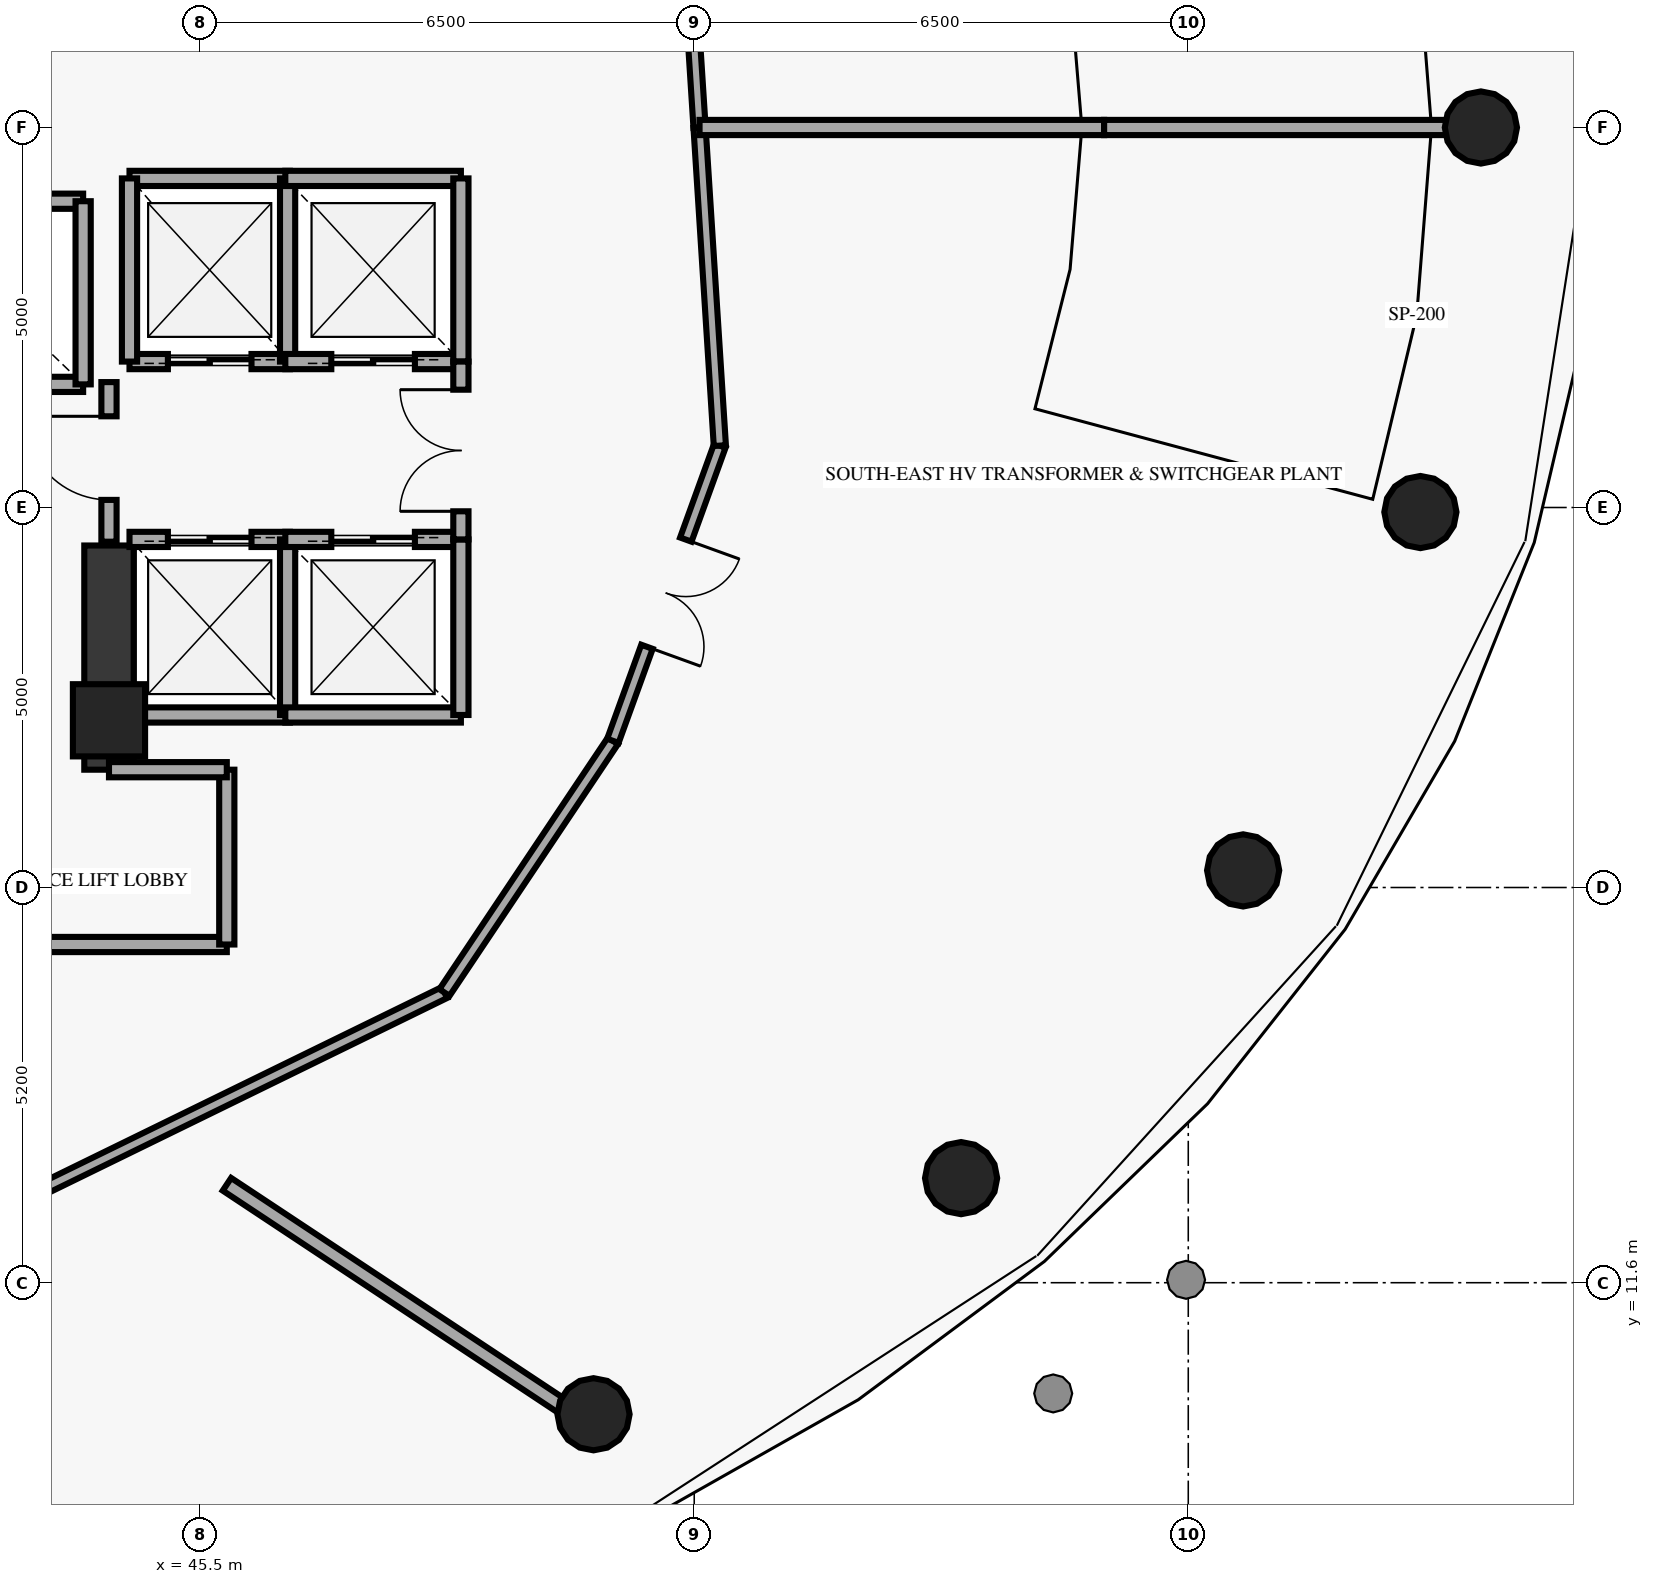
"""IFC4 building model, lengths in metres.
Left out: names, types, materials, properties, quantities, classifications, styles, units other than length and angle.
Written with IfcOpenShell. Run it as: python <this file> out.ifc"""

import sys

from ifc_helpers import new_model, si_unit, direction, frame, frame_2d, origin, origin_2d, place, context, subcontext, project, spatial, rectangle, circle, extrude, element, fill, save


model = new_model("IFC4")
c1 = context("Model", 3, precision=1e-05, world=origin(), true_north=direction((0.0, 1.0)))
c2 = subcontext(c1, "Body", "Model", "MODEL_VIEW")
j1 = project(units=[si_unit("LENGTHUNIT", "METRE"), si_unit("PLANEANGLEUNIT", "RADIAN")], contexts=[c1])
p1 = place(None, origin())
s1 = spatial("IfcSite", under=j1, at=p1, CompositionType="ELEMENT")
p2 = place(p1, origin())
s2 = spatial("IfcBuilding", under=s1, at=p2, CompositionType="ELEMENT")
p3 = place(p2, frame((0.0, 0.0, 195.95)))
s3 = spatial("IfcBuildingStorey", under=s2, at=p3, CompositionType="ELEMENT", Elevation=195.95)
p4 = place(p3, frame((44.3, 19.0, 0.0), z_axis=(0.0, 0.0, 1.0), x_axis=(1.0, 0.0, 0.0)))
e1 = element("IfcColumn", 1, at=p4, inside=s3, PredefinedType="PILASTER", context=c2, shape_type="SweptSolid", body=[
    extrude(rectangle(XDim=0.95, YDim=0.95, at=origin_2d()), origin(), (0.0, 0.0, 1.0), 6.88),
])
for number, where, z_axis, x_axis in (
    (2, (62.35, 26.8, 0.0), (0.0, 0.0, 1.0), (1.0, 0.0, 0.0)),
    (3, (50.675, 9.869, 0.0), (0.0, 0.0, 1.0), (1.0, 0.0, 0.0)),
    (4, (55.511, 12.976, 0.0), (0.0, 0.0, 1.0), (1.0, 0.0, 0.0)),
    (5, (59.222, 17.025, 0.0), (0.0, 0.0, 1.0), (1.0, 0.0, 0.0)),
    (6, (61.554, 21.74, 0.0), (0.0, 0.0, 1.0), (1.0, 0.0, 0.0)),
):
    element("IfcColumn", number, at=place(p3, frame(where, z_axis=z_axis, x_axis=x_axis)), inside=s3, PredefinedType="COLUMN", context=c2, shape_type="SweptSolid", body=[
        extrude(circle(Radius=0.475, at=origin_2d()), origin(), (0.0, 0.0, 1.0), 6.88),
    ])
p5 = place(p3, frame((44.3, 18.35, 0.0), z_axis=(0.0, 0.0, 1.0), x_axis=(0.0, 1.0, 0.0)))
e7 = element("IfcWall", 7, at=p5, inside=s3, PredefinedType="SHEAR", context=c2, shape_type="SweptSolid", body=[
    extrude(rectangle(XDim=2.95, YDim=0.65, at=frame_2d((1.475, 0.0))), origin(), (0.0, 0.0, 1.0), 6.88),
])
p6 = place(p3, frame((44.57, 23.72, 0.0), z_axis=(0.0, 0.0, 1.0), x_axis=(1.0, 0.0, 0.0)))
e8 = element("IfcWall", 8, at=p6, inside=s3, PredefinedType="SOLIDWALL", context=c2, shape_type="SweptSolid", body=[
    extrude(rectangle(XDim=2.11, YDim=0.2, at=frame_2d((1.055, 0.0))), origin(), (0.0, 0.0, 1.0), 6.88),
])
p7 = place(p6, frame((0.505, 0.0, 0.0)))
e9 = element("IfcOpeningElement", 9, at=p7, cuts=e8, PredefinedType="OPENING", context=c2, shape_type="SweptSolid", body=[
    extrude(rectangle(XDim=1.1, YDim=2.15, at=frame_2d((0.55, 1.075))), frame((0.0, 0.11, 0.0), z_axis=(0.0, -1.0, 0.0), x_axis=(1.0, 0.0, 0.0)), (0.0, 0.0, 1.0), 0.22),
])
p8 = place(p3, frame((44.57, 26.13, 0.0), z_axis=(0.0, 0.0, 1.0), x_axis=(1.0, 0.0, 0.0)))
e10 = element("IfcWall", 10, at=p8, inside=s3, PredefinedType="SOLIDWALL", context=c2, shape_type="SweptSolid", body=[
    extrude(rectangle(XDim=2.11, YDim=0.2, at=frame_2d((1.055, 0.0))), origin(), (0.0, 0.0, 1.0), 6.88),
])
for number, where, z_axis, x_axis in (
    (11, (44.57, 23.72, 0.0), (0.0, 0.0, 1.0), (0.0, 1.0, 0.0)),
    (12, (46.65, 23.72, 0.0), (0.0, 0.0, 1.0), (0.0, 1.0, 0.0)),
):
    element("IfcWall", number, at=place(p3, frame(where, z_axis=z_axis, x_axis=x_axis)), inside=s3, PredefinedType="SOLIDWALL", context=c2, shape_type="SweptSolid", body=[
        extrude(rectangle(XDim=2.41, YDim=0.2, at=frame_2d((1.205, 0.0))), origin(), (0.0, 0.0, 1.0), 6.88),
    ])
p9 = place(p3, frame((46.62, 23.72, 0.0), z_axis=(0.0, 0.0, 1.0), x_axis=(1.0, 0.0, 0.0)))
e13 = element("IfcWall", 13, at=p9, inside=s3, PredefinedType="SOLIDWALL", context=c2, shape_type="SweptSolid", body=[
    extrude(rectangle(XDim=2.31, YDim=0.2, at=frame_2d((1.155, 0.0))), origin(), (0.0, 0.0, 1.0), 6.88),
])
p10 = place(p9, frame((0.605, 0.0, 0.0)))
e14 = element("IfcOpeningElement", 14, at=p10, cuts=e13, PredefinedType="OPENING", context=c2, shape_type="SweptSolid", body=[
    extrude(rectangle(XDim=1.1, YDim=2.15, at=frame_2d((0.55, 1.075))), frame((0.0, 0.11, 0.0), z_axis=(0.0, -1.0, 0.0), x_axis=(1.0, 0.0, 0.0)), (0.0, 0.0, 1.0), 0.22),
])
p11 = place(p3, frame((46.62, 26.13, 0.0), z_axis=(0.0, 0.0, 1.0), x_axis=(1.0, 0.0, 0.0)))
e15 = element("IfcWall", 15, at=p11, inside=s3, PredefinedType="SOLIDWALL", context=c2, shape_type="SweptSolid", body=[
    extrude(rectangle(XDim=2.31, YDim=0.2, at=frame_2d((1.155, 0.0))), origin(), (0.0, 0.0, 1.0), 6.88),
])
p12 = place(p3, frame((48.93, 23.72, 0.0), z_axis=(0.0, 0.0, 1.0), x_axis=(0.0, 1.0, 0.0)))
e16 = element("IfcWall", 16, at=p12, inside=s3, PredefinedType="SOLIDWALL", context=c2, shape_type="SweptSolid", body=[
    extrude(rectangle(XDim=2.41, YDim=0.2, at=frame_2d((1.205, 0.0))), origin(), (0.0, 0.0, 1.0), 6.88),
])
p13 = place(p3, frame((44.57, 19.07, 0.0), z_axis=(0.0, 0.0, 1.0), x_axis=(1.0, 0.0, 0.0)))
e17 = element("IfcWall", 17, at=p13, inside=s3, PredefinedType="SOLIDWALL", context=c2, shape_type="SweptSolid", body=[
    extrude(rectangle(XDim=2.11, YDim=0.2, at=frame_2d((1.055, 0.0))), origin(), (0.0, 0.0, 1.0), 6.88),
])
p14 = place(p3, frame((44.57, 21.38, 0.0), z_axis=(0.0, 0.0, 1.0), x_axis=(1.0, 0.0, 0.0)))
e18 = element("IfcWall", 18, at=p14, inside=s3, PredefinedType="SOLIDWALL", context=c2, shape_type="SweptSolid", body=[
    extrude(rectangle(XDim=2.11, YDim=0.2, at=frame_2d((1.055, 0.0))), origin(), (0.0, 0.0, 1.0), 6.88),
])
p15 = place(p14, frame((0.505, 0.0, 0.0)))
e19 = element("IfcOpeningElement", 19, at=p15, cuts=e18, PredefinedType="OPENING", context=c2, shape_type="SweptSolid", body=[
    extrude(rectangle(XDim=1.1, YDim=2.15, at=frame_2d((0.55, 1.075))), frame((0.0, 0.11, 0.0), z_axis=(0.0, -1.0, 0.0), x_axis=(1.0, 0.0, 0.0)), (0.0, 0.0, 1.0), 0.22),
])
for number, where, z_axis, x_axis in (
    (20, (46.65, 19.07, 0.0), (0.0, 0.0, 1.0), (0.0, 1.0, 0.0)),
    (21, (46.62, 19.07, 0.0), (0.0, 0.0, 1.0), (1.0, 0.0, 0.0)),
):
    element("IfcWall", number, at=place(p3, frame(where, z_axis=z_axis, x_axis=x_axis)), inside=s3, PredefinedType="SOLIDWALL", context=c2, shape_type="SweptSolid", body=[
        extrude(rectangle(XDim=2.31, YDim=0.2, at=frame_2d((1.155, 0.0))), origin(), (0.0, 0.0, 1.0), 6.88),
    ])
p16 = place(p3, frame((46.62, 21.38, 0.0), z_axis=(0.0, 0.0, 1.0), x_axis=(1.0, 0.0, 0.0)))
e22 = element("IfcWall", 22, at=p16, inside=s3, PredefinedType="SOLIDWALL", context=c2, shape_type="SweptSolid", body=[
    extrude(rectangle(XDim=2.31, YDim=0.2, at=frame_2d((1.155, 0.0))), origin(), (0.0, 0.0, 1.0), 6.88),
])
p17 = place(p16, frame((0.605, 0.0, 0.0)))
e23 = element("IfcOpeningElement", 23, at=p17, cuts=e22, PredefinedType="OPENING", context=c2, shape_type="SweptSolid", body=[
    extrude(rectangle(XDim=1.1, YDim=2.15, at=frame_2d((0.55, 1.075))), frame((0.0, 0.11, 0.0), z_axis=(0.0, -1.0, 0.0), x_axis=(1.0, 0.0, 0.0)), (0.0, 0.0, 1.0), 0.22),
])
p18 = place(p3, frame((48.93, 19.07, 0.0), z_axis=(0.0, 0.0, 1.0), x_axis=(0.0, 1.0, 0.0)))
e24 = element("IfcWall", 24, at=p18, inside=s3, PredefinedType="SOLIDWALL", context=c2, shape_type="SweptSolid", body=[
    extrude(rectangle(XDim=2.31, YDim=0.2, at=frame_2d((1.155, 0.0))), origin(), (0.0, 0.0, 1.0), 6.88),
])
for number, where, z_axis, x_axis in (
    (25, (41.46, 23.42, 0.0), (0.0, 0.0, 1.0), (1.0, 0.0, 0.0)),
    (26, (41.46, 25.83, 0.0), (0.0, 0.0, 1.0), (1.0, 0.0, 0.0)),
):
    element("IfcWall", number, at=place(p3, frame(where, z_axis=z_axis, x_axis=x_axis)), inside=s3, PredefinedType="SOLIDWALL", context=c2, shape_type="SweptSolid", body=[
        extrude(rectangle(XDim=2.5, YDim=0.2, at=frame_2d((1.25, 0.0))), origin(), (0.0, 0.0, 1.0), 6.88),
    ])
p19 = place(p3, frame((43.96, 23.42, 0.0), z_axis=(0.0, 0.0, 1.0), x_axis=(0.0, 1.0, 0.0)))
e27 = element("IfcWall", 27, at=p19, inside=s3, PredefinedType="SOLIDWALL", context=c2, shape_type="SweptSolid", body=[
    extrude(rectangle(XDim=2.41, YDim=0.2, at=frame_2d((1.205, 0.0))), origin(), (0.0, 0.0, 1.0), 6.88),
])
p20 = place(p3, frame((48.93, 21.38, 0.0), z_axis=(0.0, 0.0, 1.0), x_axis=(0.0, 1.0, 0.0)))
e28 = element("IfcWall", 28, at=p20, inside=s3, PredefinedType="SOLIDWALL", context=c2, shape_type="SweptSolid", body=[
    extrude(rectangle(XDim=2.34, YDim=0.2, at=frame_2d((1.17, 0.0))), origin(), (0.0, 0.0, 1.0), 6.88),
])
p21 = place(p20, frame((0.37, 0.0, 0.0)))
e29 = element("IfcOpeningElement", 29, at=p21, cuts=e28, PredefinedType="OPENING", context=c2, shape_type="SweptSolid", body=[
    extrude(rectangle(XDim=1.6, YDim=2.2, at=frame_2d((0.8, 1.1))), frame((0.0, 0.11, 0.0), z_axis=(0.0, -1.0, 0.0), x_axis=(1.0, 0.0, 0.0)), (0.0, 0.0, 1.0), 0.22),
])
p22 = place(p3, frame((44.3, 21.35, 0.0), z_axis=(0.0, 0.0, 1.0), x_axis=(0.0, 1.0, 0.0)))
e30 = element("IfcWall", 30, at=p22, inside=s3, PredefinedType="SOLIDWALL", context=c2, shape_type="SweptSolid", body=[
    extrude(rectangle(XDim=2.1, YDim=0.2, at=frame_2d((1.05, 0.0))), origin(), (0.0, 0.0, 1.0), 6.265),
])
p23 = place(p22, frame((0.55, 0.0, 0.0)))
e31 = element("IfcOpeningElement", 31, at=p23, cuts=e30, PredefinedType="OPENING", context=c2, shape_type="SweptSolid", body=[
    extrude(rectangle(XDim=1.1, YDim=2.15, at=frame_2d((0.55, 1.075))), frame((0.0, 0.11, 0.0), z_axis=(0.0, -1.0, 0.0), x_axis=(1.0, 0.0, 0.0)), (0.0, 0.0, 1.0), 0.22),
])
p24 = place(p3, frame((41.35, 16.05, 0.0), z_axis=(0.0, 0.0, 1.0), x_axis=(1.0, 0.0, 0.0)))
e32 = element("IfcWall", 32, at=p24, inside=s3, PredefinedType="SOLIDWALL", context=c2, shape_type="SweptSolid", body=[
    extrude(rectangle(XDim=4.5, YDim=0.2, at=frame_2d((2.25, 0.0))), origin(), (0.0, 0.0, 1.0), 6.88),
])
p25 = place(p3, frame((45.85, 16.05, 0.0), z_axis=(0.0, 0.0, 1.0), x_axis=(0.0, 1.0, 0.0)))
e33 = element("IfcWall", 33, at=p25, inside=s3, PredefinedType="SOLIDWALL", context=c2, shape_type="SweptSolid", body=[
    extrude(rectangle(XDim=2.3, YDim=0.2, at=frame_2d((1.15, 0.0))), origin(), (0.0, 0.0, 1.0), 6.88),
])
p26 = place(p3, frame((44.3, 18.35, 0.0), z_axis=(0.0, 0.0, 1.0), x_axis=(1.0, 0.0, 0.0)))
e34 = element("IfcWall", 34, at=p26, inside=s3, PredefinedType="SOLIDWALL", context=c2, shape_type="SweptSolid", body=[
    extrude(rectangle(XDim=1.55, YDim=0.2, at=frame_2d((0.775, 0.0))), origin(), (0.0, 0.0, 1.0), 6.88),
])
p27 = place(p3, frame((52.07, 26.8, 0.0), z_axis=(0.0, 0.0, 1.0), x_axis=(-0.064030047677, 0.997947971086, 0.0)))
e35 = element("IfcWall", 35, at=p27, inside=s3, PredefinedType="PARTITIONING", context=c2, shape_type="SweptSolid", body=[
    extrude(rectangle(XDim=4.03, YDim=0.16, at=frame_2d((2.015, 0.0))), origin(), (0.0, 0.0, 1.0), 6.88),
])
p28 = place(p3, frame((42.318, 12.292, 0.0), z_axis=(0.0, 0.0, 1.0), x_axis=(0.898437278598, 0.439101874768, 0.0)))
e36 = element("IfcWall", 36, at=p28, inside=s3, PredefinedType="PARTITIONING", context=c2, shape_type="SweptSolid", body=[
    extrude(rectangle(XDim=7.119, YDim=0.16, at=frame_2d((3.56, 0.0))), origin(), (0.0, 0.0, 1.0), 6.88),
])
p29 = place(p3, frame((48.714, 15.418, 0.0), z_axis=(0.0, 0.0, 1.0), x_axis=(0.556056751682, 0.831144324958, 0.0)))
e37 = element("IfcWall", 37, at=p29, inside=s3, PredefinedType="PARTITIONING", context=c2, shape_type="SweptSolid", body=[
    extrude(rectangle(XDim=3.985, YDim=0.16, at=frame_2d((1.992, 0.0))), origin(), (0.0, 0.0, 1.0), 6.88),
])
p30 = place(p3, frame((52.337, 22.614, 0.0), z_axis=(0.0, 0.0, 1.0), x_axis=(-0.34058972089, -0.940212019719, 0.0)))
e38 = element("IfcWall", 38, at=p30, inside=s3, PredefinedType="PARTITIONING", context=c2, shape_type="SweptSolid", body=[
    extrude(rectangle(XDim=4.131, YDim=0.16, at=frame_2d((2.065, 0.0))), origin(), (0.0, 0.0, 1.0), 6.88),
])
p31 = place(p30, frame((1.315, 0.0, 0.0)))
e39 = element("IfcOpeningElement", 39, at=p31, cuts=e38, PredefinedType="OPENING", context=c2, shape_type="SweptSolid", body=[
    extrude(rectangle(XDim=1.5, YDim=2.2, at=frame_2d((0.75, 1.1))), frame((0.0, 0.09, 0.0), z_axis=(0.0, -1.0, 0.0), x_axis=(1.0, 0.0, 0.0)), (0.0, 0.0, 1.0), 0.18),
])
p32 = place(p3, frame((52.337, 22.614, 0.0), z_axis=(0.0, 0.0, 1.0), x_axis=(-0.063617518313, 0.997974354061, 0.0)))
e40 = element("IfcWall", 40, at=p32, inside=s3, PredefinedType="PARTITIONING", context=c2, shape_type="SweptSolid", body=[
    extrude(rectangle(XDim=4.195, YDim=0.16, at=frame_2d((2.097, 0.0))), origin(), (0.0, 0.0, 1.0), 6.88),
])
p33 = place(p3, frame((52.07, 26.8, 0.0), z_axis=(0.0, 0.0, 1.0), x_axis=(1.0, 0.0, 0.0)))
e41 = element("IfcWall", 41, at=p33, inside=s3, PredefinedType="SOLIDWALL", context=c2, shape_type="SweptSolid", body=[
    extrude(rectangle(XDim=5.323, YDim=0.2, at=frame_2d((2.662, 0.0))), origin(), (0.0, 0.0, 1.0), 6.88),
])
p34 = place(p3, frame((57.393, 26.8, 0.0), z_axis=(0.0, 0.0, 1.0), x_axis=(1.0, 0.0, 0.0)))
e42 = element("IfcWall", 42, at=p34, inside=s3, PredefinedType="SOLIDWALL", context=c2, shape_type="SweptSolid", body=[
    extrude(rectangle(XDim=5.272, YDim=0.2, at=frame_2d((2.636, 0.0))), origin(), (0.0, 0.0, 1.0), 4.88),
])
p35 = place(p3, frame((45.852, 12.895, 0.0), z_axis=(0.0, 0.0, 1.0), x_axis=(0.833712545804, -0.552198687945, 0.0)))
e43 = element("IfcWall", 43, at=p35, inside=s3, PredefinedType="SOLIDWALL", context=c2, shape_type="SweptSolid", body=[
    extrude(rectangle(XDim=5.974, YDim=0.2, at=frame_2d((2.987, 0.0))), origin(), (0.0, 0.0, 1.0), 6.88),
])
p36 = place(p7, origin())
e44 = element("IfcDoor", 44, at=p36, inside=s3, OperationType="DOUBLE_DOOR_SLIDING", PredefinedType="DOOR", context=c2, shape_type="SweptSolid", body=[
    extrude(rectangle(XDim=1.1, YDim=2.15, at=frame_2d((0.55, 1.075))), frame((0.0, 0.025, 0.0), z_axis=(0.0, -1.0, 0.0), x_axis=(1.0, 0.0, 0.0)), (0.0, 0.0, 1.0), 0.05),
])
fill(e9, e44)
p37 = place(p10, origin())
e45 = element("IfcDoor", 45, at=p37, inside=s3, OperationType="DOUBLE_DOOR_SLIDING", PredefinedType="DOOR", context=c2, shape_type="SweptSolid", body=[
    extrude(rectangle(XDim=1.1, YDim=2.15, at=frame_2d((0.55, 1.075))), frame((0.0, 0.025, 0.0), z_axis=(0.0, -1.0, 0.0), x_axis=(1.0, 0.0, 0.0)), (0.0, 0.0, 1.0), 0.05),
])
fill(e14, e45)
p38 = place(p15, origin())
e46 = element("IfcDoor", 46, at=p38, inside=s3, OperationType="DOUBLE_DOOR_SLIDING", PredefinedType="DOOR", context=c2, shape_type="SweptSolid", body=[
    extrude(rectangle(XDim=1.1, YDim=2.15, at=frame_2d((0.55, 1.075))), frame((0.0, 0.025, 0.0), z_axis=(0.0, -1.0, 0.0), x_axis=(1.0, 0.0, 0.0)), (0.0, 0.0, 1.0), 0.05),
])
fill(e19, e46)
p39 = place(p17, origin())
e47 = element("IfcDoor", 47, at=p39, inside=s3, OperationType="DOUBLE_DOOR_SLIDING", PredefinedType="DOOR", context=c2, shape_type="SweptSolid", body=[
    extrude(rectangle(XDim=1.1, YDim=2.15, at=frame_2d((0.55, 1.075))), frame((0.0, 0.025, 0.0), z_axis=(0.0, -1.0, 0.0), x_axis=(1.0, 0.0, 0.0)), (0.0, 0.0, 1.0), 0.05),
])
fill(e23, e47)
p40 = place(p21, origin())
e48 = element("IfcDoor", 48, at=p40, inside=s3, OperationType="DOUBLE_DOOR_SINGLE_SWING", PredefinedType="DOOR", context=c2, shape_type="SweptSolid", body=[
    extrude(rectangle(XDim=1.6, YDim=2.2, at=frame_2d((0.8, 1.1))), frame((0.0, 0.025, 0.0), z_axis=(0.0, -1.0, 0.0), x_axis=(1.0, 0.0, 0.0)), (0.0, 0.0, 1.0), 0.05),
])
fill(e29, e48)
p41 = place(p23, origin())
e49 = element("IfcDoor", 49, at=p41, inside=s3, OperationType="SINGLE_SWING_RIGHT", PredefinedType="DOOR", context=c2, shape_type="SweptSolid", body=[
    extrude(rectangle(XDim=1.1, YDim=2.15, at=frame_2d((0.55, 1.075))), frame((0.0, 0.025, 0.0), z_axis=(0.0, -1.0, 0.0), x_axis=(1.0, 0.0, 0.0)), (0.0, 0.0, 1.0), 0.05),
])
fill(e31, e49)
p42 = place(p31, origin())
e50 = element("IfcDoor", 50, at=p42, inside=s3, OperationType="DOUBLE_DOOR_SINGLE_SWING", PredefinedType="DOOR", context=c2, shape_type="SweptSolid", body=[
    extrude(rectangle(XDim=1.5, YDim=2.2, at=frame_2d((0.75, 1.1))), frame((0.0, 0.025, 0.0), z_axis=(0.0, -1.0, 0.0), x_axis=(1.0, 0.0, 0.0)), (0.0, 0.0, 1.0), 0.05),
])
fill(e39, e50)
save(model, sys.argv[1])
